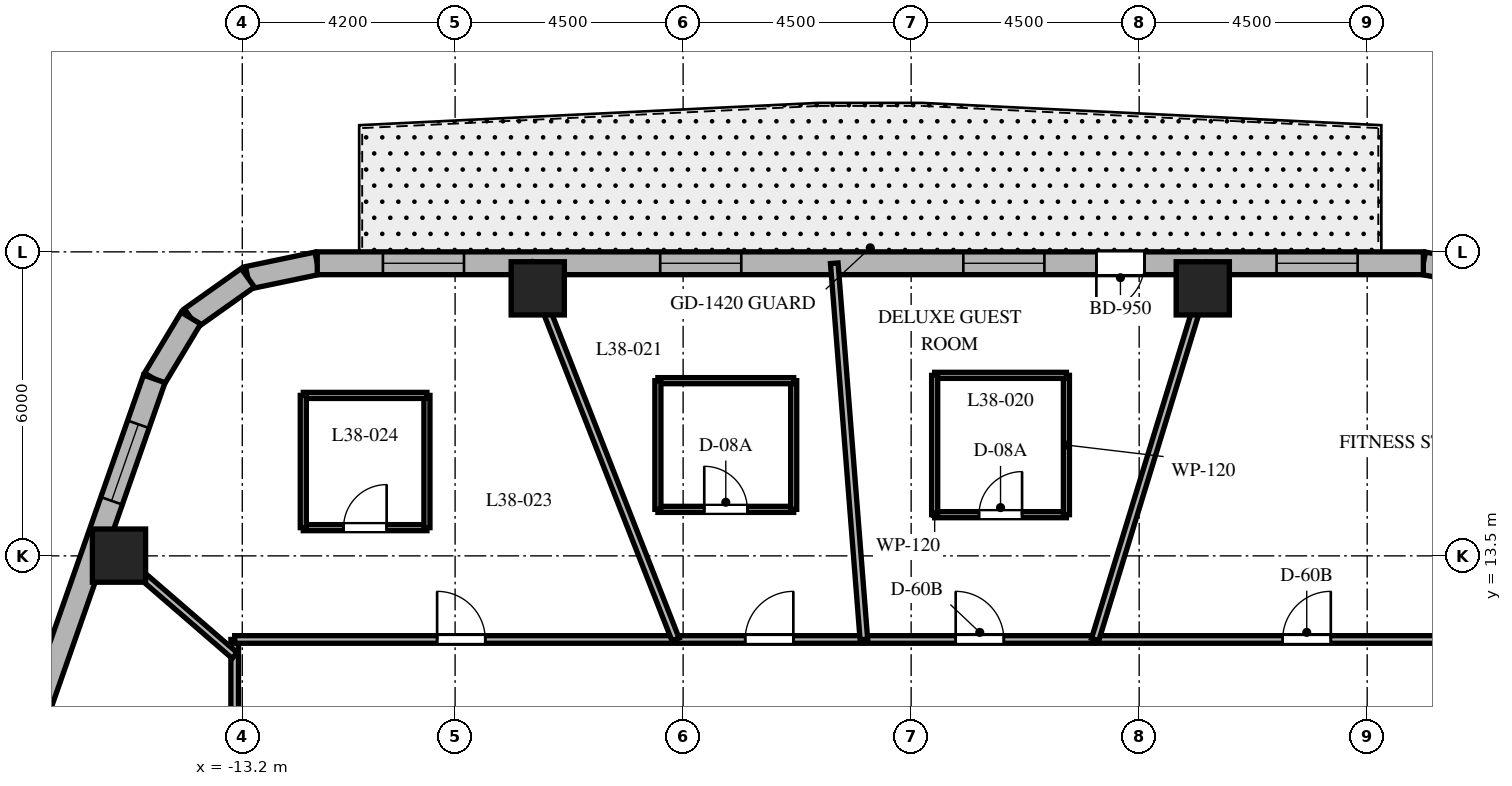
"""IFC4 building model, lengths in metres.
Left out: names, types, materials, properties, quantities, classifications, styles, units other than length and angle.
Written with IfcOpenShell. Run it as: python <this file> out.ifc"""

import sys

from ifc_helpers import new_model, si_unit, direction, frame, frame_2d, origin, origin_2d, place, context, subcontext, project, spatial, rectangle, extrude, element, fill, save


model = new_model("IFC4")
c1 = context("Model", 3, precision=1e-05, world=origin(), true_north=direction((0.0, 1.0)))
c2 = subcontext(c1, "Body", "Model", "MODEL_VIEW")
j1 = project(units=[si_unit("LENGTHUNIT", "METRE"), si_unit("PLANEANGLEUNIT", "RADIAN")], contexts=[c1])
p1 = place(None, origin())
s1 = spatial("IfcSite", under=j1, at=p1, CompositionType="ELEMENT")
p2 = place(p1, origin())
s2 = spatial("IfcBuilding", under=s1, at=p2, CompositionType="ELEMENT")
p3 = place(p2, frame((0.0, 0.0, 155.4)))
s3 = spatial("IfcBuildingStorey", under=s2, at=p3, CompositionType="ELEMENT", Elevation=155.4)
for number, where, z_axis, x_axis in (
    (1, (5.755, 18.78, 0.0), (0.0, 0.0, 1.0), (1.0, 0.0, 0.0)),
    (2, (-7.369, 18.78, 0.0), (0.0, 0.0, 1.0), (1.0, 0.0, 0.0)),
    (3, (-15.633, 13.505, 0.0), (0.0, 0.0, 1.0), (1.0, 0.0, 0.0)),
):
    element("IfcColumn", number, at=place(p3, frame(where, z_axis=z_axis, x_axis=x_axis)), inside=s3, PredefinedType="COLUMN", context=c2, shape_type="SweptSolid", body=[
        extrude(rectangle(XDim=1.05, YDim=1.05, at=origin_2d()), origin(), (0.0, 0.0, 1.0), 3.7),
    ])
p4 = place(p3, frame((11.349, 19.043, 0.0), z_axis=(0.0, 0.0, 1.0), x_axis=(-0.982931267051, 0.183973161772, 0.0)))
e4 = element("IfcWall", 4, at=p4, inside=s3, PredefinedType="SOLIDWALL", context=c2, shape_type="SweptSolid", body=[
    extrude(rectangle(XDim=1.262, YDim=0.45, at=frame_2d((0.631, 0.0))), origin(), (0.0, 0.0, 1.0), 3.4),
])
p5 = place(p3, frame((-11.72, 19.275, 0.0), z_axis=(0.0, 0.0, 1.0), x_axis=(-0.97893106758, -0.204191001093, 0.0)))
e5 = element("IfcWall", 5, at=p5, inside=s3, PredefinedType="SOLIDWALL", context=c2, shape_type="SweptSolid", body=[
    extrude(rectangle(XDim=1.4, YDim=0.45, at=frame_2d((0.7, 0.0))), origin(), (0.0, 0.0, 1.0), 3.4),
])
p6 = place(p3, frame((-13.091, 18.989, 0.0), z_axis=(0.0, 0.0, 1.0), x_axis=(-0.815574637848, -0.578651890258, 0.0)))
e6 = element("IfcWall", 6, at=p6, inside=s3, PredefinedType="SOLIDWALL", context=c2, shape_type="SweptSolid", body=[
    extrude(rectangle(XDim=1.377, YDim=0.45, at=frame_2d((0.688, 0.0))), origin(), (0.0, 0.0, 1.0), 3.4),
])
p7 = place(p3, frame((-14.214, 18.192, 0.0), z_axis=(0.0, 0.0, 1.0), x_axis=(-0.516340945502, -0.856383108193, 0.0)))
e7 = element("IfcWall", 7, at=p7, inside=s3, PredefinedType="SOLIDWALL", context=c2, shape_type="SweptSolid", body=[
    extrude(rectangle(XDim=1.4, YDim=0.45, at=frame_2d((0.7, 0.0))), origin(), (0.0, 0.0, 1.0), 3.4),
])
p8 = place(p3, frame((10.108, 19.275, 0.0), z_axis=(0.0, 0.0, 1.0), x_axis=(-1.0, 0.0, 0.0)))
e8 = element("IfcWall", 8, at=p8, inside=s3, PredefinedType="SOLIDWALL", context=c2, shape_type="SweptSolid", body=[
    extrude(rectangle(XDim=21.829, YDim=0.45, at=frame_2d((10.915, 0.0))), origin(), (0.0, 0.0, 1.0), 3.4),
])
p9 = place(p8, frame((5.503, 0.0, 0.0)))
e9 = element("IfcOpeningElement", 9, at=p9, cuts=e8, PredefinedType="OPENING", context=c2, shape_type="SweptSolid", body=[
    extrude(rectangle(XDim=0.95, YDim=2.15, at=frame_2d((0.475, 1.075))), frame((0.0, 0.235, 0.0), z_axis=(0.0, -1.0, 0.0), x_axis=(1.0, 0.0, 0.0)), (0.0, 0.0, 1.0), 0.47),
])
p10 = place(p8, frame((1.297, 0.0, 0.8)))
e10 = element("IfcOpeningElement", 10, at=p10, cuts=e8, PredefinedType="OPENING", context=c2, shape_type="SweptSolid", body=[
    extrude(rectangle(XDim=1.6, YDim=1.75, at=frame_2d((0.8, 0.875))), frame((0.0, 0.235, 0.0), z_axis=(0.0, -1.0, 0.0), x_axis=(1.0, 0.0, 0.0)), (0.0, 0.0, 1.0), 0.47),
])
p11 = place(p8, frame((7.479, 0.0, 0.8)))
e11 = element("IfcOpeningElement", 11, at=p11, cuts=e8, PredefinedType="OPENING", context=c2, shape_type="SweptSolid", body=[
    extrude(rectangle(XDim=1.6, YDim=1.75, at=frame_2d((0.8, 0.875))), frame((0.0, 0.235, 0.0), z_axis=(0.0, -1.0, 0.0), x_axis=(1.0, 0.0, 0.0)), (0.0, 0.0, 1.0), 0.47),
])
p12 = place(p8, frame((13.461, 0.0, 0.8)))
e12 = element("IfcOpeningElement", 12, at=p12, cuts=e8, PredefinedType="OPENING", context=c2, shape_type="SweptSolid", body=[
    extrude(rectangle(XDim=1.6, YDim=1.75, at=frame_2d((0.8, 0.875))), frame((0.0, 0.235, 0.0), z_axis=(0.0, -1.0, 0.0), x_axis=(1.0, 0.0, 0.0)), (0.0, 0.0, 1.0), 0.47),
])
p13 = place(p8, frame((18.933, 0.0, 0.8)))
e13 = element("IfcOpeningElement", 13, at=p13, cuts=e8, PredefinedType="OPENING", context=c2, shape_type="SweptSolid", body=[
    extrude(rectangle(XDim=1.6, YDim=1.75, at=frame_2d((0.8, 0.875))), frame((0.0, 0.235, 0.0), z_axis=(0.0, -1.0, 0.0), x_axis=(1.0, 0.0, 0.0)), (0.0, 0.0, 1.0), 0.47),
])
p14 = place(p3, frame((-14.937, 16.993, 0.0), z_axis=(0.0, 0.0, 1.0), x_axis=(-0.330431575061, -0.943829949834, 0.0)))
e14 = element("IfcWall", 14, at=p14, inside=s3, PredefinedType="SOLIDWALL", context=c2, shape_type="SweptSolid", body=[
    extrude(rectangle(XDim=17.689, YDim=0.45, at=frame_2d((8.844, 0.0))), origin(), (0.0, 0.0, 1.0), 3.4),
])
p15 = place(p14, frame((0.95, 0.0, 0.8)))
e15 = element("IfcOpeningElement", 15, at=p15, cuts=e14, PredefinedType="OPENING", context=c2, shape_type="SweptSolid", body=[
    extrude(rectangle(XDim=1.6, YDim=1.75, at=frame_2d((0.8, 0.875))), frame((0.0, 0.235, 0.0), z_axis=(0.0, -1.0, 0.0), x_axis=(1.0, 0.0, 0.0)), (0.0, 0.0, 1.0), 0.47),
])
p16 = place(p14, frame((7.99, 0.0, 0.8)))
e16 = element("IfcOpeningElement", 16, at=p16, cuts=e14, PredefinedType="OPENING", context=c2, shape_type="SweptSolid", body=[
    extrude(rectangle(XDim=1.6, YDim=1.75, at=frame_2d((0.8, 0.875))), frame((0.0, 0.235, 0.0), z_axis=(0.0, -1.0, 0.0), x_axis=(1.0, 0.0, 0.0)), (0.0, 0.0, 1.0), 0.47),
])
p17 = place(p14, frame((15.084, 0.0, 0.8)))
e17 = element("IfcOpeningElement", 17, at=p17, cuts=e14, PredefinedType="OPENING", context=c2, shape_type="SweptSolid", body=[
    extrude(rectangle(XDim=1.6, YDim=1.75, at=frame_2d((0.8, 0.875))), frame((0.0, 0.235, 0.0), z_axis=(0.0, -1.0, 0.0), x_axis=(1.0, 0.0, 0.0)), (0.0, 0.0, 1.0), 0.47),
])
p18 = place(p3, frame((-13.35, -11.85, 0.0), z_axis=(0.0, 0.0, 1.0), x_axis=(0.0, 1.0, 0.0)))
e18 = element("IfcWall", 18, at=p18, inside=s3, PredefinedType="PARTITIONING", context=c2, shape_type="SweptSolid", body=[
    extrude(rectangle(XDim=23.7, YDim=0.15, at=frame_2d((11.85, 0.0))), origin(), (0.0, 0.0, 1.0), 2.84),
])
p19 = place(p18, frame((18.389, 0.0, 0.0)))
e19 = element("IfcOpeningElement", 19, at=p19, cuts=e18, PredefinedType="OPENING", context=c2, shape_type="SweptSolid", body=[
    extrude(rectangle(XDim=0.95, YDim=2.03, at=frame_2d((0.475, 1.015))), frame((0.0, 0.085, 0.0), z_axis=(0.0, -1.0, 0.0), x_axis=(1.0, 0.0, 0.0)), (0.0, 0.0, 1.0), 0.17),
])
p20 = place(p18, frame((10.751, 0.0, 0.0)))
e20 = element("IfcOpeningElement", 20, at=p20, cuts=e18, PredefinedType="OPENING", context=c2, shape_type="SweptSolid", body=[
    extrude(rectangle(XDim=0.95, YDim=2.03, at=frame_2d((0.475, 1.015))), frame((0.0, 0.085, 0.0), z_axis=(0.0, -1.0, 0.0), x_axis=(1.0, 0.0, 0.0)), (0.0, 0.0, 1.0), 0.17),
])
p21 = place(p18, frame((5.951, 0.0, 0.0)))
e21 = element("IfcOpeningElement", 21, at=p21, cuts=e18, PredefinedType="OPENING", context=c2, shape_type="SweptSolid", body=[
    extrude(rectangle(XDim=0.9, YDim=2.03, at=frame_2d((0.45, 1.015))), frame((0.0, 0.085, 0.0), z_axis=(0.0, -1.0, 0.0), x_axis=(1.0, 0.0, 0.0)), (0.0, 0.0, 1.0), 0.17),
])
p22 = place(p18, frame((1.993, 0.0, 0.0)))
e22 = element("IfcOpeningElement", 22, at=p22, cuts=e18, PredefinedType="OPENING", context=c2, shape_type="SweptSolid", body=[
    extrude(rectangle(XDim=0.9, YDim=2.03, at=frame_2d((0.45, 1.015))), frame((0.0, 0.085, 0.0), z_axis=(0.0, -1.0, 0.0), x_axis=(1.0, 0.0, 0.0)), (0.0, 0.0, 1.0), 0.17),
])
p23 = place(p3, frame((-13.35, 11.85, 0.0), z_axis=(0.0, 0.0, 1.0), x_axis=(1.0, 0.0, 0.0)))
e23 = element("IfcWall", 23, at=p23, inside=s3, PredefinedType="PARTITIONING", context=c2, shape_type="SweptSolid", body=[
    extrude(rectangle(XDim=26.7, YDim=0.15, at=frame_2d((13.35, 0.0))), origin(), (0.0, 0.0, 1.0), 2.84),
])
p24 = place(p23, frame((20.682, 0.0, 0.0)))
e24 = element("IfcOpeningElement", 24, at=p24, cuts=e23, PredefinedType="OPENING", context=c2, shape_type="SweptSolid", body=[
    extrude(rectangle(XDim=0.95, YDim=2.03, at=frame_2d((0.475, 1.015))), frame((0.0, 0.085, 0.0), z_axis=(0.0, -1.0, 0.0), x_axis=(1.0, 0.0, 0.0)), (0.0, 0.0, 1.0), 0.17),
])
p25 = place(p23, frame((14.229, 0.0, 0.0)))
e25 = element("IfcOpeningElement", 25, at=p25, cuts=e23, PredefinedType="OPENING", context=c2, shape_type="SweptSolid", body=[
    extrude(rectangle(XDim=0.95, YDim=2.03, at=frame_2d((0.475, 1.015))), frame((0.0, 0.085, 0.0), z_axis=(0.0, -1.0, 0.0), x_axis=(1.0, 0.0, 0.0)), (0.0, 0.0, 1.0), 0.17),
])
p26 = place(p23, frame((10.075, 0.0, 0.0)))
e26 = element("IfcOpeningElement", 26, at=p26, cuts=e23, PredefinedType="OPENING", context=c2, shape_type="SweptSolid", body=[
    extrude(rectangle(XDim=0.95, YDim=2.03, at=frame_2d((0.475, 1.015))), frame((0.0, 0.085, 0.0), z_axis=(0.0, -1.0, 0.0), x_axis=(1.0, 0.0, 0.0)), (0.0, 0.0, 1.0), 0.17),
])
p27 = place(p23, frame((3.995, 0.0, 0.0)))
e27 = element("IfcOpeningElement", 27, at=p27, cuts=e23, PredefinedType="OPENING", context=c2, shape_type="SweptSolid", body=[
    extrude(rectangle(XDim=0.95, YDim=2.03, at=frame_2d((0.475, 1.015))), frame((0.0, 0.085, 0.0), z_axis=(0.0, -1.0, 0.0), x_axis=(1.0, 0.0, 0.0)), (0.0, 0.0, 1.0), 0.17),
])
p28 = place(p3, frame((3.631, 11.85, 0.0), z_axis=(0.0, 0.0, 1.0), x_axis=(0.293007573338, 0.956110120209, 0.0)))
e28 = element("IfcWall", 28, at=p28, inside=s3, PredefinedType="PARTITIONING", context=c2, shape_type="SweptSolid", body=[
    extrude(rectangle(XDim=7.766, YDim=0.15, at=frame_2d((3.883, 0.0))), origin(), (0.0, 0.0, 1.0), 2.64),
])
p29 = place(p3, frame((-0.933, 11.85, 0.0), z_axis=(0.0, 0.0, 1.0), x_axis=(-0.078476156849, 0.996915990847, 0.0)))
e29 = element("IfcWall", 29, at=p29, inside=s3, PredefinedType="PARTITIONING", context=c2, shape_type="SweptSolid", body=[
    extrude(rectangle(XDim=7.448, YDim=0.15, at=frame_2d((3.724, 0.0))), origin(), (0.0, 0.0, 1.0), 2.64),
])
p30 = place(p3, frame((-4.65, 11.85, 0.0), z_axis=(0.0, 0.0, 1.0), x_axis=(-0.365265947993, 0.930903210456, 0.0)))
e30 = element("IfcWall", 30, at=p30, inside=s3, PredefinedType="PARTITIONING", context=c2, shape_type="SweptSolid", body=[
    extrude(rectangle(XDim=7.976, YDim=0.15, at=frame_2d((3.988, 0.0))), origin(), (0.0, 0.0, 1.0), 2.64),
])
p31 = place(p3, frame((-13.35, 11.533, 0.0), z_axis=(0.0, 0.0, 1.0), x_axis=(-0.756711647314, 0.65374879183, 0.0)))
e31 = element("IfcWall", 31, at=p31, inside=s3, PredefinedType="PARTITIONING", context=c2, shape_type="SweptSolid", body=[
    extrude(rectangle(XDim=3.55, YDim=0.15, at=frame_2d((1.775, 0.0))), origin(), (0.0, 0.0, 1.0), 2.64),
])
p32 = place(p3, frame((0.464, 14.313, 0.0), z_axis=(0.0, 0.0, 1.0), x_axis=(1.0, 0.0, 0.0)))
e32 = element("IfcWall", 32, at=p32, inside=s3, PredefinedType="PARTITIONING", context=c2, shape_type="SweptSolid", body=[
    extrude(rectangle(XDim=2.6, YDim=0.12, at=frame_2d((1.3, 0.0))), origin(), (0.0, 0.0, 1.0), 3.4),
])
p33 = place(p32, frame((0.875, 0.0, 0.0)))
e33 = element("IfcOpeningElement", 33, at=p33, cuts=e32, PredefinedType="OPENING", context=c2, shape_type="SweptSolid", body=[
    extrude(rectangle(XDim=0.85, YDim=2.03, at=frame_2d((0.425, 1.015))), frame((0.0, 0.07, 0.0), z_axis=(0.0, -1.0, 0.0), x_axis=(1.0, 0.0, 0.0)), (0.0, 0.0, 1.0), 0.14),
])
p34 = place(p3, frame((3.064, 14.313, 0.0), z_axis=(0.0, 0.0, 1.0), x_axis=(0.0, 1.0, 0.0)))
e34 = element("IfcWall", 34, at=p34, inside=s3, PredefinedType="PARTITIONING", context=c2, shape_type="SweptSolid", body=[
    extrude(rectangle(XDim=2.75, YDim=0.12, at=frame_2d((1.375, 0.0))), origin(), (0.0, 0.0, 1.0), 2.841),
])
p35 = place(p3, frame((3.064, 17.063, 0.0), z_axis=(0.0, 0.0, 1.0), x_axis=(-1.0, 0.0, 0.0)))
e35 = element("IfcWall", 35, at=p35, inside=s3, PredefinedType="PARTITIONING", context=c2, shape_type="SweptSolid", body=[
    extrude(rectangle(XDim=2.6, YDim=0.12, at=frame_2d((1.3, 0.0))), origin(), (0.0, 0.0, 1.0), 3.4),
])
p36 = place(p3, frame((0.464, 17.063, 0.0), z_axis=(0.0, 0.0, 1.0), x_axis=(0.0, -1.0, 0.0)))
e36 = element("IfcWall", 36, at=p36, inside=s3, PredefinedType="PARTITIONING", context=c2, shape_type="SweptSolid", body=[
    extrude(rectangle(XDim=2.75, YDim=0.12, at=frame_2d((1.375, 0.0))), origin(), (0.0, 0.0, 1.0), 2.841),
])
p37 = place(p3, frame((-4.998, 14.418, 0.0), z_axis=(0.0, 0.0, 1.0), x_axis=(1.0, 0.0, 0.0)))
e37 = element("IfcWall", 37, at=p37, inside=s3, PredefinedType="PARTITIONING", context=c2, shape_type="SweptSolid", body=[
    extrude(rectangle(XDim=2.68, YDim=0.12, at=frame_2d((1.34, 0.0))), origin(), (0.0, 0.0, 1.0), 3.4),
])
p38 = place(p37, frame((0.915, 0.0, 0.0)))
e38 = element("IfcOpeningElement", 38, at=p38, cuts=e37, PredefinedType="OPENING", context=c2, shape_type="SweptSolid", body=[
    extrude(rectangle(XDim=0.85, YDim=2.03, at=frame_2d((0.425, 1.015))), frame((0.0, 0.07, 0.0), z_axis=(0.0, -1.0, 0.0), x_axis=(1.0, 0.0, 0.0)), (0.0, 0.0, 1.0), 0.14),
])
p39 = place(p3, frame((-2.318, 14.418, 0.0), z_axis=(0.0, 0.0, 1.0), x_axis=(0.0, 1.0, 0.0)))
e39 = element("IfcWall", 39, at=p39, inside=s3, PredefinedType="PARTITIONING", context=c2, shape_type="SweptSolid", body=[
    extrude(rectangle(XDim=2.54, YDim=0.12, at=frame_2d((1.27, 0.0))), origin(), (0.0, 0.0, 1.0), 2.841),
])
p40 = place(p3, frame((-2.318, 16.958, 0.0), z_axis=(0.0, 0.0, 1.0), x_axis=(-1.0, 0.0, 0.0)))
e40 = element("IfcWall", 40, at=p40, inside=s3, PredefinedType="PARTITIONING", context=c2, shape_type="SweptSolid", body=[
    extrude(rectangle(XDim=2.68, YDim=0.12, at=frame_2d((1.34, 0.0))), origin(), (0.0, 0.0, 1.0), 3.4),
])
p41 = place(p3, frame((-4.998, 16.958, 0.0), z_axis=(0.0, 0.0, 1.0), x_axis=(0.0, -1.0, 0.0)))
e41 = element("IfcWall", 41, at=p41, inside=s3, PredefinedType="PARTITIONING", context=c2, shape_type="SweptSolid", body=[
    extrude(rectangle(XDim=2.54, YDim=0.12, at=frame_2d((1.27, 0.0))), origin(), (0.0, 0.0, 1.0), 2.841),
])
p42 = place(p3, frame((-11.996, 14.057, 0.0), z_axis=(0.0, 0.0, 1.0), x_axis=(1.0, 0.0, 0.0)))
e42 = element("IfcWall", 42, at=p42, inside=s3, PredefinedType="PARTITIONING", context=c2, shape_type="SweptSolid", body=[
    extrude(rectangle(XDim=2.44, YDim=0.12, at=frame_2d((1.22, 0.0))), origin(), (0.0, 0.0, 1.0), 2.927),
])
p43 = place(p42, frame((0.795, 0.0, 0.0)))
e43 = element("IfcOpeningElement", 43, at=p43, cuts=e42, PredefinedType="OPENING", context=c2, shape_type="SweptSolid", body=[
    extrude(rectangle(XDim=0.85, YDim=2.03, at=frame_2d((0.425, 1.015))), frame((0.0, 0.07, 0.0), z_axis=(0.0, -1.0, 0.0), x_axis=(1.0, 0.0, 0.0)), (0.0, 0.0, 1.0), 0.14),
])
p44 = place(p3, frame((-9.556, 14.057, 0.0), z_axis=(0.0, 0.0, 1.0), x_axis=(0.0, 1.0, 0.0)))
e44 = element("IfcWall", 44, at=p44, inside=s3, PredefinedType="PARTITIONING", context=c2, shape_type="SweptSolid", body=[
    extrude(rectangle(XDim=2.61, YDim=0.12, at=frame_2d((1.305, 0.0))), origin(), (0.0, 0.0, 1.0), 2.927),
])
p45 = place(p3, frame((-9.556, 16.667, 0.0), z_axis=(0.0, 0.0, 1.0), x_axis=(-1.0, 0.0, 0.0)))
e45 = element("IfcWall", 45, at=p45, inside=s3, PredefinedType="PARTITIONING", context=c2, shape_type="SweptSolid", body=[
    extrude(rectangle(XDim=2.44, YDim=0.12, at=frame_2d((1.22, 0.0))), origin(), (0.0, 0.0, 1.0), 2.64),
])
p46 = place(p3, frame((-11.996, 16.667, 0.0), z_axis=(0.0, 0.0, 1.0), x_axis=(0.0, -1.0, 0.0)))
e46 = element("IfcWall", 46, at=p46, inside=s3, PredefinedType="PARTITIONING", context=c2, shape_type="SweptSolid", body=[
    extrude(rectangle(XDim=2.61, YDim=0.12, at=frame_2d((1.305, 0.0))), origin(), (0.0, 0.0, 1.0), 2.64),
])
p47 = place(p9, origin())
e47 = element("IfcDoor", 47, at=p47, inside=s3, OperationType="SINGLE_SWING_RIGHT", PredefinedType="DOOR", context=c2, shape_type="SweptSolid", body=[
    extrude(rectangle(XDim=0.95, YDim=2.15, at=frame_2d((0.475, 1.075))), frame((0.0, 0.025, 0.0), z_axis=(0.0, -1.0, 0.0), x_axis=(1.0, 0.0, 0.0)), (0.0, 0.0, 1.0), 0.05),
])
fill(e9, e47)
p48 = place(p10, origin())
e48 = element("IfcWindow", 48, at=p48, inside=s3, PartitioningType="SINGLE_PANEL", PredefinedType="WINDOW", context=c2, shape_type="SweptSolid", body=[
    extrude(rectangle(XDim=1.6, YDim=1.75, at=frame_2d((0.8, 0.875))), frame((0.0, 0.03, 0.0), z_axis=(0.0, -1.0, 0.0), x_axis=(1.0, 0.0, 0.0)), (0.0, 0.0, 1.0), 0.06),
])
fill(e10, e48)
p49 = place(p11, origin())
e49 = element("IfcWindow", 49, at=p49, inside=s3, PartitioningType="SINGLE_PANEL", PredefinedType="WINDOW", context=c2, shape_type="SweptSolid", body=[
    extrude(rectangle(XDim=1.6, YDim=1.75, at=frame_2d((0.8, 0.875))), frame((0.0, 0.03, 0.0), z_axis=(0.0, -1.0, 0.0), x_axis=(1.0, 0.0, 0.0)), (0.0, 0.0, 1.0), 0.06),
])
fill(e11, e49)
p50 = place(p12, origin())
e50 = element("IfcWindow", 50, at=p50, inside=s3, PartitioningType="SINGLE_PANEL", PredefinedType="WINDOW", context=c2, shape_type="SweptSolid", body=[
    extrude(rectangle(XDim=1.6, YDim=1.75, at=frame_2d((0.8, 0.875))), frame((0.0, 0.03, 0.0), z_axis=(0.0, -1.0, 0.0), x_axis=(1.0, 0.0, 0.0)), (0.0, 0.0, 1.0), 0.06),
])
fill(e12, e50)
p51 = place(p13, origin())
e51 = element("IfcWindow", 51, at=p51, inside=s3, PartitioningType="SINGLE_PANEL", PredefinedType="WINDOW", context=c2, shape_type="SweptSolid", body=[
    extrude(rectangle(XDim=1.6, YDim=1.75, at=frame_2d((0.8, 0.875))), frame((0.0, 0.03, 0.0), z_axis=(0.0, -1.0, 0.0), x_axis=(1.0, 0.0, 0.0)), (0.0, 0.0, 1.0), 0.06),
])
fill(e13, e51)
p52 = place(p15, origin())
e52 = element("IfcWindow", 52, at=p52, inside=s3, PartitioningType="SINGLE_PANEL", PredefinedType="WINDOW", context=c2, shape_type="SweptSolid", body=[
    extrude(rectangle(XDim=1.6, YDim=1.75, at=frame_2d((0.8, 0.875))), frame((0.0, 0.03, 0.0), z_axis=(0.0, -1.0, 0.0), x_axis=(1.0, 0.0, 0.0)), (0.0, 0.0, 1.0), 0.06),
])
fill(e15, e52)
p53 = place(p24, origin())
e53 = element("IfcDoor", 53, at=p53, inside=s3, OperationType="SINGLE_SWING_RIGHT", PredefinedType="DOOR", context=c2, shape_type="SweptSolid", body=[
    extrude(rectangle(XDim=0.95, YDim=2.03, at=frame_2d((0.475, 1.015))), frame((0.0, 0.025, 0.0), z_axis=(0.0, -1.0, 0.0), x_axis=(1.0, 0.0, 0.0)), (0.0, 0.0, 1.0), 0.05),
])
fill(e24, e53)
p54 = place(p25, origin())
e54 = element("IfcDoor", 54, at=p54, inside=s3, OperationType="SINGLE_SWING_LEFT", PredefinedType="DOOR", context=c2, shape_type="SweptSolid", body=[
    extrude(rectangle(XDim=0.95, YDim=2.03, at=frame_2d((0.475, 1.015))), frame((0.0, 0.025, 0.0), z_axis=(0.0, -1.0, 0.0), x_axis=(1.0, 0.0, 0.0)), (0.0, 0.0, 1.0), 0.05),
])
fill(e25, e54)
p55 = place(p33, origin())
e55 = element("IfcDoor", 55, at=p55, inside=s3, OperationType="SINGLE_SWING_RIGHT", PredefinedType="DOOR", context=c2, shape_type="SweptSolid", body=[
    extrude(rectangle(XDim=0.85, YDim=2.03, at=frame_2d((0.425, 1.015))), frame((0.0, 0.025, 0.0), z_axis=(0.0, -1.0, 0.0), x_axis=(1.0, 0.0, 0.0)), (0.0, 0.0, 1.0), 0.05),
])
fill(e33, e55)
p56 = place(p26, origin())
e56 = element("IfcDoor", 56, at=p56, inside=s3, OperationType="SINGLE_SWING_RIGHT", PredefinedType="DOOR", context=c2, shape_type="SweptSolid", body=[
    extrude(rectangle(XDim=0.95, YDim=2.03, at=frame_2d((0.475, 1.015))), frame((0.0, 0.025, 0.0), z_axis=(0.0, -1.0, 0.0), x_axis=(1.0, 0.0, 0.0)), (0.0, 0.0, 1.0), 0.05),
])
fill(e26, e56)
p57 = place(p38, origin())
e57 = element("IfcDoor", 57, at=p57, inside=s3, OperationType="SINGLE_SWING_LEFT", PredefinedType="DOOR", context=c2, shape_type="SweptSolid", body=[
    extrude(rectangle(XDim=0.85, YDim=2.03, at=frame_2d((0.425, 1.015))), frame((0.0, 0.025, 0.0), z_axis=(0.0, -1.0, 0.0), x_axis=(1.0, 0.0, 0.0)), (0.0, 0.0, 1.0), 0.05),
])
fill(e38, e57)
p58 = place(p27, origin())
e58 = element("IfcDoor", 58, at=p58, inside=s3, OperationType="SINGLE_SWING_LEFT", PredefinedType="DOOR", context=c2, shape_type="SweptSolid", body=[
    extrude(rectangle(XDim=0.95, YDim=2.03, at=frame_2d((0.475, 1.015))), frame((0.0, 0.025, 0.0), z_axis=(0.0, -1.0, 0.0), x_axis=(1.0, 0.0, 0.0)), (0.0, 0.0, 1.0), 0.05),
])
fill(e27, e58)
p59 = place(p43, origin())
e59 = element("IfcDoor", 59, at=p59, inside=s3, OperationType="SINGLE_SWING_RIGHT", PredefinedType="DOOR", context=c2, shape_type="SweptSolid", body=[
    extrude(rectangle(XDim=0.85, YDim=2.03, at=frame_2d((0.425, 1.015))), frame((0.0, 0.025, 0.0), z_axis=(0.0, -1.0, 0.0), x_axis=(1.0, 0.0, 0.0)), (0.0, 0.0, 1.0), 0.05),
])
fill(e43, e59)
save(model, sys.argv[1])
